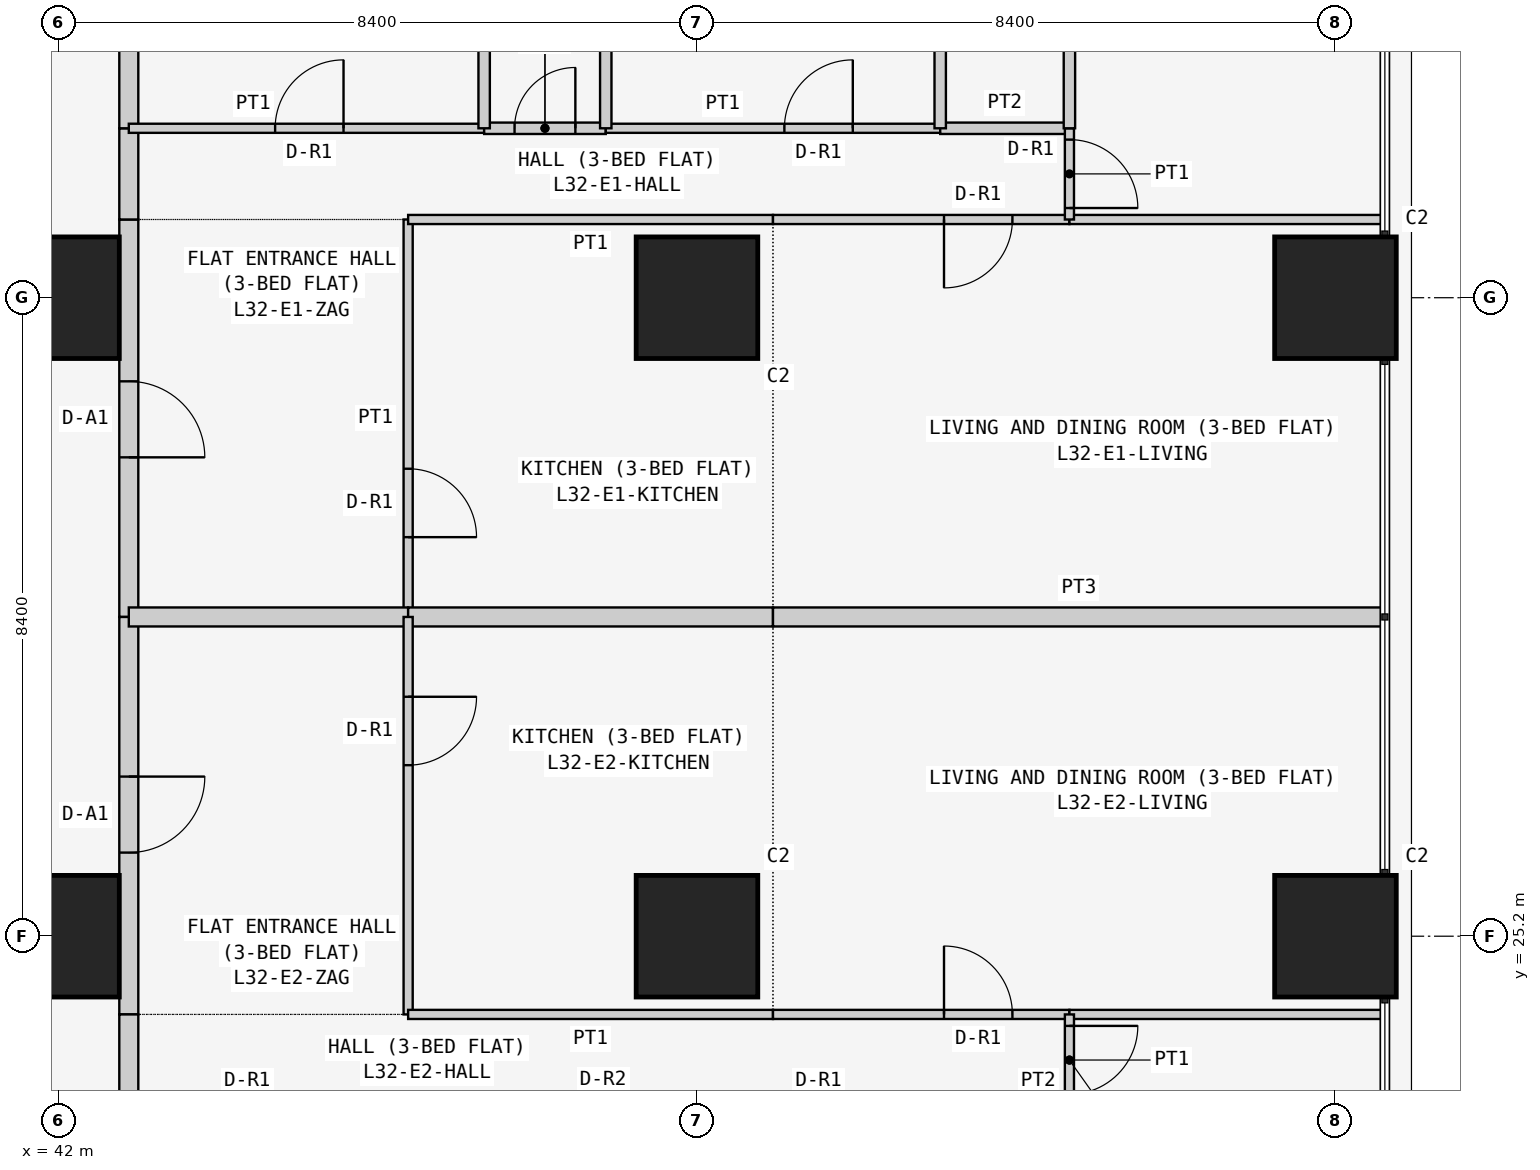
"""IFC4 building model, lengths in metres.
Left out: names, types, materials, properties, quantities, classifications, styles, units other than length and angle.
Written with IfcOpenShell. Run it as: python <this file> out.ifc"""

import sys

from ifc_helpers import new_model, si_unit, direction, frame, frame_2d, origin, origin_2d, place, context, subcontext, project, spatial, rectangle, extrude, element, fill, save


model = new_model("IFC4")
c1 = context("Model", 3, precision=1e-05, world=origin(), true_north=direction((0.0, 1.0)))
c2 = subcontext(c1, "Body", "Model", "MODEL_VIEW")
j1 = project(units=[si_unit("LENGTHUNIT", "METRE"), si_unit("PLANEANGLEUNIT", "RADIAN")], contexts=[c1])
p1 = place(None, origin())
s1 = spatial("IfcSite", under=j1, at=p1, CompositionType="ELEMENT")
p2 = place(p1, origin())
s2 = spatial("IfcBuilding", under=s1, at=p2, CompositionType="ELEMENT")
p3 = place(p2, frame((0.0, 0.0, 126.9)))
s3 = spatial("IfcBuildingStorey", under=s2, at=p3, CompositionType="ELEMENT", Elevation=126.9)
for number, where, z_axis, x_axis in (
    (1, (42.0, 25.2, 0.0), (0.0, 0.0, 1.0), (1.0, 0.0, 0.0)),
    (2, (42.0, 33.6, 0.0), (0.0, 0.0, 1.0), (1.0, 0.0, 0.0)),
    (3, (50.4, 25.2, 0.0), (0.0, 0.0, 1.0), (1.0, 0.0, 0.0)),
    (4, (50.4, 33.6, 0.0), (0.0, 0.0, 1.0), (1.0, 0.0, 0.0)),
    (5, (58.8, 25.2, 0.0), (0.0, 0.0, 1.0), (1.0, 0.0, 0.0)),
    (6, (58.8, 33.6, 0.0), (0.0, 0.0, 1.0), (1.0, 0.0, 0.0)),
):
    element("IfcColumn", number, at=place(p3, frame(where, z_axis=z_axis, x_axis=x_axis)), inside=s3, PredefinedType="COLUMN", context=c2, shape_type="SweptSolid", body=[
        extrude(rectangle(XDim=1.6, YDim=1.6, at=origin_2d()), origin(), (0.0, 0.0, 1.0), 3.6),
    ])
p4 = place(p3, frame((42.925, 34.629, 0.0), z_axis=(0.0, 0.0, 1.0), x_axis=(0.0, -1.0, 0.0)))
e7 = element("IfcWall", 7, at=p4, inside=s3, PredefinedType="PARTITIONING", context=c2, shape_type="SweptSolid", body=[
    extrude(rectangle(XDim=5.229, YDim=0.25, at=frame_2d((2.615, 0.0))), origin(), (0.0, 0.0, 1.0), 3.45),
])
p5 = place(p4, frame((2.129, 0.0, 0.0)))
e8 = element("IfcOpeningElement", 8, at=p5, cuts=e7, PredefinedType="OPENING", context=c2, shape_type="SweptSolid", body=[
    extrude(rectangle(XDim=1.0, YDim=2.1, at=frame_2d((0.5, 1.05))), frame((0.0, 0.135, 0.0), z_axis=(0.0, -1.0, 0.0), x_axis=(1.0, 0.0, 0.0)), (0.0, 0.0, 1.0), 0.27),
])
p6 = place(p3, frame((42.925, 35.829, 0.0), z_axis=(0.0, 0.0, 1.0), x_axis=(0.0, -1.0, 0.0)))
e9 = element("IfcWall", 9, at=p6, inside=s3, PredefinedType="PARTITIONING", context=c2, shape_type="SweptSolid", body=[
    extrude(rectangle(XDim=1.2, YDim=0.25, at=frame_2d((0.6, 0.0))), origin(), (0.0, 0.0, 1.0), 3.45),
])
p7 = place(p3, frame((42.925, 42.7, 0.0), z_axis=(0.0, 0.0, 1.0), x_axis=(0.0, -1.0, 0.0)))
e10 = element("IfcWall", 10, at=p7, inside=s3, PredefinedType="PARTITIONING", context=c2, shape_type="SweptSolid", body=[
    extrude(rectangle(XDim=6.871, YDim=0.25, at=frame_2d((3.436, 0.0))), origin(), (0.0, 0.0, 1.0), 3.45),
])
p8 = place(p3, frame((42.925, 29.4, 0.0), z_axis=(0.0, 0.0, 1.0), x_axis=(0.0, -1.0, 0.0)))
e11 = element("IfcWall", 11, at=p8, inside=s3, PredefinedType="PARTITIONING", context=c2, shape_type="SweptSolid", body=[
    extrude(rectangle(XDim=5.229, YDim=0.25, at=frame_2d((2.615, 0.0))), origin(), (0.0, 0.0, 1.0), 3.45),
])
p9 = place(p8, frame((2.1, 0.0, 0.0)))
e12 = element("IfcOpeningElement", 12, at=p9, cuts=e11, PredefinedType="OPENING", context=c2, shape_type="SweptSolid", body=[
    extrude(rectangle(XDim=1.0, YDim=2.1, at=frame_2d((0.5, 1.05))), frame((0.0, 0.135, 0.0), z_axis=(0.0, -1.0, 0.0), x_axis=(1.0, 0.0, 0.0)), (0.0, 0.0, 1.0), 0.27),
])
p10 = place(p3, frame((42.925, 24.171, 0.0), z_axis=(0.0, 0.0, 1.0), x_axis=(0.0, -1.0, 0.0)))
e13 = element("IfcWall", 13, at=p10, inside=s3, PredefinedType="PARTITIONING", context=c2, shape_type="SweptSolid", body=[
    extrude(rectangle(XDim=1.2, YDim=0.25, at=frame_2d((0.6, 0.0))), origin(), (0.0, 0.0, 1.0), 3.45),
])
p11 = place(p3, frame((46.6, 29.4, 0.0), z_axis=(0.0, 0.0, 1.0), x_axis=(0.0, 1.0, 0.0)))
e14 = element("IfcWall", 14, at=p11, inside=s3, PredefinedType="PARTITIONING", context=c2, shape_type="SweptSolid", body=[
    extrude(rectangle(XDim=5.229, YDim=0.12, at=frame_2d((2.615, 0.0))), origin(), (0.0, 0.0, 1.0), 3.45),
])
p12 = place(p11, frame((1.05, 0.0, 0.0)))
e15 = element("IfcOpeningElement", 15, at=p12, cuts=e14, PredefinedType="OPENING", context=c2, shape_type="SweptSolid", body=[
    extrude(rectangle(XDim=0.9, YDim=2.1, at=frame_2d((0.45, 1.05))), frame((0.0, 0.07, 0.0), z_axis=(0.0, -1.0, 0.0), x_axis=(1.0, 0.0, 0.0)), (0.0, 0.0, 1.0), 0.14),
])
p13 = place(p3, frame((42.925, 29.4, 0.0), z_axis=(0.0, 0.0, 1.0), x_axis=(1.0, 0.0, 0.0)))
e16 = element("IfcWall", 16, at=p13, inside=s3, PredefinedType="PARTITIONING", context=c2, shape_type="SweptSolid", body=[
    extrude(rectangle(XDim=3.675, YDim=0.25, at=frame_2d((1.837, 0.0))), origin(), (0.0, 0.0, 1.0), 3.45),
])
p14 = place(p3, frame((51.4, 34.629, 0.0), z_axis=(0.0, 0.0, 1.0), x_axis=(-1.0, 0.0, 0.0)))
e17 = element("IfcWall", 17, at=p14, inside=s3, PredefinedType="PARTITIONING", context=c2, shape_type="SweptSolid", body=[
    extrude(rectangle(XDim=4.8, YDim=0.12, at=frame_2d((2.4, 0.0))), origin(), (0.0, 0.0, 1.0), 3.45),
])
p15 = place(p3, frame((46.6, 29.4, 0.0), z_axis=(0.0, 0.0, 1.0), x_axis=(1.0, 0.0, 0.0)))
e18 = element("IfcWall", 18, at=p15, inside=s3, PredefinedType="PARTITIONING", context=c2, shape_type="SweptSolid", body=[
    extrude(rectangle(XDim=4.8, YDim=0.25, at=frame_2d((2.4, 0.0))), origin(), (0.0, 0.0, 1.0), 3.45),
])
p16 = place(p3, frame((55.3, 34.629, 0.0), z_axis=(0.0, 0.0, 1.0), x_axis=(-1.0, 0.0, 0.0)))
e19 = element("IfcWall", 19, at=p16, inside=s3, PredefinedType="PARTITIONING", context=c2, shape_type="SweptSolid", body=[
    extrude(rectangle(XDim=3.9, YDim=0.12, at=frame_2d((1.95, 0.0))), origin(), (0.0, 0.0, 1.0), 3.45),
])
p17 = place(p16, frame((0.75, 0.0, 0.0)))
e20 = element("IfcOpeningElement", 20, at=p17, cuts=e19, PredefinedType="OPENING", context=c2, shape_type="SweptSolid", body=[
    extrude(rectangle(XDim=0.9, YDim=2.1, at=frame_2d((0.45, 1.05))), frame((0.0, 0.07, 0.0), z_axis=(0.0, -1.0, 0.0), x_axis=(1.0, 0.0, 0.0)), (0.0, 0.0, 1.0), 0.14),
])
p18 = place(p3, frame((59.45, 34.629, 0.0), z_axis=(0.0, 0.0, 1.0), x_axis=(-1.0, 0.0, 0.0)))
e21 = element("IfcWall", 21, at=p18, inside=s3, PredefinedType="PARTITIONING", context=c2, shape_type="SweptSolid", body=[
    extrude(rectangle(XDim=4.15, YDim=0.12, at=frame_2d((2.075, 0.0))), origin(), (0.0, 0.0, 1.0), 3.45),
])
p19 = place(p3, frame((51.4, 29.4, 0.0), z_axis=(0.0, 0.0, 1.0), x_axis=(1.0, 0.0, 0.0)))
e22 = element("IfcWall", 22, at=p19, inside=s3, PredefinedType="PARTITIONING", context=c2, shape_type="SweptSolid", body=[
    extrude(rectangle(XDim=8.05, YDim=0.25, at=frame_2d((4.025, 0.0))), origin(), (0.0, 0.0, 1.0), 3.45),
])
p20 = place(p3, frame((47.6, 35.829, 0.0), z_axis=(0.0, 0.0, 1.0), x_axis=(-1.0, 0.0, 0.0)))
e23 = element("IfcWall", 23, at=p20, inside=s3, PredefinedType="PARTITIONING", context=c2, shape_type="SweptSolid", body=[
    extrude(rectangle(XDim=4.675, YDim=0.12, at=frame_2d((2.337, 0.0))), origin(), (0.0, 0.0, 1.0), 3.45),
])
p21 = place(p20, frame((1.85, 0.0, 0.0)))
e24 = element("IfcOpeningElement", 24, at=p21, cuts=e23, PredefinedType="OPENING", context=c2, shape_type="SweptSolid", body=[
    extrude(rectangle(XDim=0.9, YDim=2.1, at=frame_2d((0.45, 1.05))), frame((0.0, 0.07, 0.0), z_axis=(0.0, -1.0, 0.0), x_axis=(1.0, 0.0, 0.0)), (0.0, 0.0, 1.0), 0.14),
])
p22 = place(p3, frame((49.2, 35.829, 0.0), z_axis=(0.0, 0.0, 1.0), x_axis=(-1.0, 0.0, 0.0)))
e25 = element("IfcWall", 25, at=p22, inside=s3, PredefinedType="PARTITIONING", context=c2, shape_type="SweptSolid", body=[
    extrude(rectangle(XDim=1.6, YDim=0.15, at=frame_2d((0.8, 0.0))), origin(), (0.0, 0.0, 1.0), 3.45),
])
p23 = place(p22, frame((0.4, 0.0, 0.0)))
e26 = element("IfcOpeningElement", 26, at=p23, cuts=e25, PredefinedType="OPENING", context=c2, shape_type="SweptSolid", body=[
    extrude(rectangle(XDim=0.8, YDim=2.1, at=frame_2d((0.4, 1.05))), frame((0.0, 0.085, 0.0), z_axis=(0.0, -1.0, 0.0), x_axis=(1.0, 0.0, 0.0)), (0.0, 0.0, 1.0), 0.17),
])
p24 = place(p3, frame((53.6, 35.829, 0.0), z_axis=(0.0, 0.0, 1.0), x_axis=(-1.0, 0.0, 0.0)))
e27 = element("IfcWall", 27, at=p24, inside=s3, PredefinedType="PARTITIONING", context=c2, shape_type="SweptSolid", body=[
    extrude(rectangle(XDim=4.4, YDim=0.12, at=frame_2d((2.2, 0.0))), origin(), (0.0, 0.0, 1.0), 3.45),
])
p25 = place(p24, frame((1.15, 0.0, 0.0)))
e28 = element("IfcOpeningElement", 28, at=p25, cuts=e27, PredefinedType="OPENING", context=c2, shape_type="SweptSolid", body=[
    extrude(rectangle(XDim=0.9, YDim=2.1, at=frame_2d((0.45, 1.05))), frame((0.0, 0.07, 0.0), z_axis=(0.0, -1.0, 0.0), x_axis=(1.0, 0.0, 0.0)), (0.0, 0.0, 1.0), 0.14),
])
p26 = place(p3, frame((55.3, 35.829, 0.0), z_axis=(0.0, 0.0, 1.0), x_axis=(-1.0, 0.0, 0.0)))
e29 = element("IfcWall", 29, at=p26, inside=s3, PredefinedType="PARTITIONING", context=c2, shape_type="SweptSolid", body=[
    extrude(rectangle(XDim=1.7, YDim=0.15, at=frame_2d((0.85, 0.0))), origin(), (0.0, 0.0, 1.0), 3.45),
])
p27 = place(p3, frame((55.3, 34.629, 0.0), z_axis=(0.0, 0.0, 1.0), x_axis=(0.0, 1.0, 0.0)))
e30 = element("IfcWall", 30, at=p27, inside=s3, PredefinedType="PARTITIONING", context=c2, shape_type="SweptSolid", body=[
    extrude(rectangle(XDim=1.2, YDim=0.12, at=frame_2d((0.6, 0.0))), origin(), (0.0, 0.0, 1.0), 3.45),
])
p28 = place(p27, frame((0.151, 0.0, 0.0)))
e31 = element("IfcOpeningElement", 31, at=p28, cuts=e30, PredefinedType="OPENING", context=c2, shape_type="SweptSolid", body=[
    extrude(rectangle(XDim=0.9, YDim=2.1, at=frame_2d((0.45, 1.05))), frame((0.0, 0.07, 0.0), z_axis=(0.0, -1.0, 0.0), x_axis=(1.0, 0.0, 0.0)), (0.0, 0.0, 1.0), 0.14),
])
for number, where, z_axis, x_axis in (
    (32, (47.6, 35.829, 0.0), (0.0, 0.0, 1.0), (0.0, 1.0, 0.0)),
    (33, (49.2, 35.829, 0.0), (0.0, 0.0, 1.0), (0.0, 1.0, 0.0)),
    (34, (53.6, 35.829, 0.0), (0.0, 0.0, 1.0), (0.0, 1.0, 0.0)),
):
    element("IfcWall", number, at=place(p3, frame(where, z_axis=z_axis, x_axis=x_axis)), inside=s3, PredefinedType="PARTITIONING", context=c2, shape_type="SweptSolid", body=[
        extrude(rectangle(XDim=6.871, YDim=0.15, at=frame_2d((3.436, 0.0))), origin(), (0.0, 0.0, 1.0), 3.45),
    ])
p29 = place(p3, frame((55.3, 35.829, 0.0), z_axis=(0.0, 0.0, 1.0), x_axis=(0.0, 1.0, 0.0)))
e35 = element("IfcWall", 35, at=p29, inside=s3, PredefinedType="PARTITIONING", context=c2, shape_type="SweptSolid", body=[
    extrude(rectangle(XDim=6.871, YDim=0.15, at=frame_2d((3.436, 0.0))), origin(), (0.0, 0.0, 1.0), 3.45),
])
p30 = place(p29, frame((3.171, 0.0, 0.0)))
e36 = element("IfcOpeningElement", 36, at=p30, cuts=e35, PredefinedType="OPENING", context=c2, shape_type="SweptSolid", body=[
    extrude(rectangle(XDim=0.8, YDim=2.1, at=frame_2d((0.4, 1.05))), frame((0.0, 0.085, 0.0), z_axis=(0.0, -1.0, 0.0), x_axis=(1.0, 0.0, 0.0)), (0.0, 0.0, 1.0), 0.17),
])
p31 = place(p3, frame((46.6, 29.4, 0.0), z_axis=(0.0, 0.0, 1.0), x_axis=(0.0, -1.0, 0.0)))
e37 = element("IfcWall", 37, at=p31, inside=s3, PredefinedType="PARTITIONING", context=c2, shape_type="SweptSolid", body=[
    extrude(rectangle(XDim=5.229, YDim=0.12, at=frame_2d((2.615, 0.0))), origin(), (0.0, 0.0, 1.0), 3.45),
])
p32 = place(p31, frame((1.05, 0.0, 0.0)))
e38 = element("IfcOpeningElement", 38, at=p32, cuts=e37, PredefinedType="OPENING", context=c2, shape_type="SweptSolid", body=[
    extrude(rectangle(XDim=0.9, YDim=2.1, at=frame_2d((0.45, 1.05))), frame((0.0, 0.07, 0.0), z_axis=(0.0, -1.0, 0.0), x_axis=(1.0, 0.0, 0.0)), (0.0, 0.0, 1.0), 0.14),
])
p33 = place(p3, frame((51.4, 24.171, 0.0), z_axis=(0.0, 0.0, 1.0), x_axis=(-1.0, 0.0, 0.0)))
e39 = element("IfcWall", 39, at=p33, inside=s3, PredefinedType="PARTITIONING", context=c2, shape_type="SweptSolid", body=[
    extrude(rectangle(XDim=4.8, YDim=0.12, at=frame_2d((2.4, 0.0))), origin(), (0.0, 0.0, 1.0), 3.45),
])
p34 = place(p3, frame((55.3, 24.171, 0.0), z_axis=(0.0, 0.0, 1.0), x_axis=(-1.0, 0.0, 0.0)))
e40 = element("IfcWall", 40, at=p34, inside=s3, PredefinedType="PARTITIONING", context=c2, shape_type="SweptSolid", body=[
    extrude(rectangle(XDim=3.9, YDim=0.12, at=frame_2d((1.95, 0.0))), origin(), (0.0, 0.0, 1.0), 3.45),
])
p35 = place(p34, frame((0.75, 0.0, 0.0)))
e41 = element("IfcOpeningElement", 41, at=p35, cuts=e40, PredefinedType="OPENING", context=c2, shape_type="SweptSolid", body=[
    extrude(rectangle(XDim=0.9, YDim=2.1, at=frame_2d((0.45, 1.05))), frame((0.0, 0.07, 0.0), z_axis=(0.0, -1.0, 0.0), x_axis=(1.0, 0.0, 0.0)), (0.0, 0.0, 1.0), 0.14),
])
p36 = place(p3, frame((59.45, 24.171, 0.0), z_axis=(0.0, 0.0, 1.0), x_axis=(-1.0, 0.0, 0.0)))
e42 = element("IfcWall", 42, at=p36, inside=s3, PredefinedType="PARTITIONING", context=c2, shape_type="SweptSolid", body=[
    extrude(rectangle(XDim=4.15, YDim=0.12, at=frame_2d((2.075, 0.0))), origin(), (0.0, 0.0, 1.0), 3.45),
])
p37 = place(p3, frame((55.3, 24.171, 0.0), z_axis=(0.0, 0.0, 1.0), x_axis=(0.0, -1.0, 0.0)))
e43 = element("IfcWall", 43, at=p37, inside=s3, PredefinedType="PARTITIONING", context=c2, shape_type="SweptSolid", body=[
    extrude(rectangle(XDim=1.2, YDim=0.12, at=frame_2d((0.6, 0.0))), origin(), (0.0, 0.0, 1.0), 3.45),
])
p38 = place(p37, frame((0.151, 0.0, 0.0)))
e44 = element("IfcOpeningElement", 44, at=p38, cuts=e43, PredefinedType="OPENING", context=c2, shape_type="SweptSolid", body=[
    extrude(rectangle(XDim=0.9, YDim=2.1, at=frame_2d((0.45, 1.05))), frame((0.0, 0.07, 0.0), z_axis=(0.0, -1.0, 0.0), x_axis=(1.0, 0.0, 0.0)), (0.0, 0.0, 1.0), 0.14),
])
p39 = place(p5, origin())
e45 = element("IfcDoor", 45, at=p39, inside=s3, OperationType="SINGLE_SWING_RIGHT", PredefinedType="DOOR", context=c2, shape_type="SweptSolid", body=[
    extrude(rectangle(XDim=1.0, YDim=2.1, at=frame_2d((0.5, 1.05))), frame((0.0, 0.025, 0.0), z_axis=(0.0, -1.0, 0.0), x_axis=(1.0, 0.0, 0.0)), (0.0, 0.0, 1.0), 0.05),
])
fill(e8, e45)
p40 = place(p12, frame((0.9, 0.0, 0.0), z_axis=(0.0, 0.0, 1.0), x_axis=(-1.0, 0.0, 0.0)))
e46 = element("IfcDoor", 46, at=p40, inside=s3, OperationType="SINGLE_SWING_RIGHT", PredefinedType="DOOR", context=c2, shape_type="SweptSolid", body=[
    extrude(rectangle(XDim=0.9, YDim=2.1, at=frame_2d((0.45, 1.05))), frame((0.0, 0.025, 0.0), z_axis=(0.0, -1.0, 0.0), x_axis=(1.0, 0.0, 0.0)), (0.0, 0.0, 1.0), 0.05),
])
fill(e15, e46)
p41 = place(p17, origin())
e47 = element("IfcDoor", 47, at=p41, inside=s3, OperationType="SINGLE_SWING_RIGHT", PredefinedType="DOOR", context=c2, shape_type="SweptSolid", body=[
    extrude(rectangle(XDim=0.9, YDim=2.1, at=frame_2d((0.45, 1.05))), frame((0.0, 0.025, 0.0), z_axis=(0.0, -1.0, 0.0), x_axis=(1.0, 0.0, 0.0)), (0.0, 0.0, 1.0), 0.05),
])
fill(e20, e47)
p42 = place(p21, frame((0.9, 0.0, 0.0), z_axis=(0.0, 0.0, 1.0), x_axis=(-1.0, 0.0, 0.0)))
e48 = element("IfcDoor", 48, at=p42, inside=s3, OperationType="SINGLE_SWING_RIGHT", PredefinedType="DOOR", context=c2, shape_type="SweptSolid", body=[
    extrude(rectangle(XDim=0.9, YDim=2.1, at=frame_2d((0.45, 1.05))), frame((0.0, 0.025, 0.0), z_axis=(0.0, -1.0, 0.0), x_axis=(1.0, 0.0, 0.0)), (0.0, 0.0, 1.0), 0.05),
])
fill(e24, e48)
p43 = place(p23, frame((0.8, 0.0, 0.0), z_axis=(0.0, 0.0, 1.0), x_axis=(-1.0, 0.0, 0.0)))
e49 = element("IfcDoor", 49, at=p43, inside=s3, OperationType="SINGLE_SWING_RIGHT", PredefinedType="DOOR", context=c2, shape_type="SweptSolid", body=[
    extrude(rectangle(XDim=0.8, YDim=2.1, at=frame_2d((0.4, 1.05))), frame((0.0, 0.025, 0.0), z_axis=(0.0, -1.0, 0.0), x_axis=(1.0, 0.0, 0.0)), (0.0, 0.0, 1.0), 0.05),
])
fill(e26, e49)
p44 = place(p25, frame((0.9, 0.0, 0.0), z_axis=(0.0, 0.0, 1.0), x_axis=(-1.0, 0.0, 0.0)))
e50 = element("IfcDoor", 50, at=p44, inside=s3, OperationType="SINGLE_SWING_RIGHT", PredefinedType="DOOR", context=c2, shape_type="SweptSolid", body=[
    extrude(rectangle(XDim=0.9, YDim=2.1, at=frame_2d((0.45, 1.05))), frame((0.0, 0.025, 0.0), z_axis=(0.0, -1.0, 0.0), x_axis=(1.0, 0.0, 0.0)), (0.0, 0.0, 1.0), 0.05),
])
fill(e28, e50)
p45 = place(p28, frame((0.9, 0.0, 0.0), z_axis=(0.0, 0.0, 1.0), x_axis=(-1.0, 0.0, 0.0)))
e51 = element("IfcDoor", 51, at=p45, inside=s3, OperationType="SINGLE_SWING_RIGHT", PredefinedType="DOOR", context=c2, shape_type="SweptSolid", body=[
    extrude(rectangle(XDim=0.9, YDim=2.1, at=frame_2d((0.45, 1.05))), frame((0.0, 0.025, 0.0), z_axis=(0.0, -1.0, 0.0), x_axis=(1.0, 0.0, 0.0)), (0.0, 0.0, 1.0), 0.05),
])
fill(e31, e51)
p46 = place(p9, origin())
e52 = element("IfcDoor", 52, at=p46, inside=s3, OperationType="SINGLE_SWING_LEFT", PredefinedType="DOOR", context=c2, shape_type="SweptSolid", body=[
    extrude(rectangle(XDim=1.0, YDim=2.1, at=frame_2d((0.5, 1.05))), frame((0.0, 0.025, 0.0), z_axis=(0.0, -1.0, 0.0), x_axis=(1.0, 0.0, 0.0)), (0.0, 0.0, 1.0), 0.05),
])
fill(e12, e52)
p47 = place(p32, origin())
e53 = element("IfcDoor", 53, at=p47, inside=s3, OperationType="SINGLE_SWING_LEFT", PredefinedType="DOOR", context=c2, shape_type="SweptSolid", body=[
    extrude(rectangle(XDim=0.9, YDim=2.1, at=frame_2d((0.45, 1.05))), frame((0.0, 0.025, 0.0), z_axis=(0.0, -1.0, 0.0), x_axis=(1.0, 0.0, 0.0)), (0.0, 0.0, 1.0), 0.05),
])
fill(e38, e53)
p48 = place(p35, frame((0.9, 0.0, 0.0), z_axis=(0.0, 0.0, 1.0), x_axis=(-1.0, 0.0, 0.0)))
e54 = element("IfcDoor", 54, at=p48, inside=s3, OperationType="SINGLE_SWING_LEFT", PredefinedType="DOOR", context=c2, shape_type="SweptSolid", body=[
    extrude(rectangle(XDim=0.9, YDim=2.1, at=frame_2d((0.45, 1.05))), frame((0.0, 0.025, 0.0), z_axis=(0.0, -1.0, 0.0), x_axis=(1.0, 0.0, 0.0)), (0.0, 0.0, 1.0), 0.05),
])
fill(e41, e54)
p49 = place(p38, origin())
e55 = element("IfcDoor", 55, at=p49, inside=s3, OperationType="SINGLE_SWING_LEFT", PredefinedType="DOOR", context=c2, shape_type="SweptSolid", body=[
    extrude(rectangle(XDim=0.9, YDim=2.1, at=frame_2d((0.45, 1.05))), frame((0.0, 0.025, 0.0), z_axis=(0.0, -1.0, 0.0), x_axis=(1.0, 0.0, 0.0)), (0.0, 0.0, 1.0), 0.05),
])
fill(e44, e55)
save(model, sys.argv[1])
